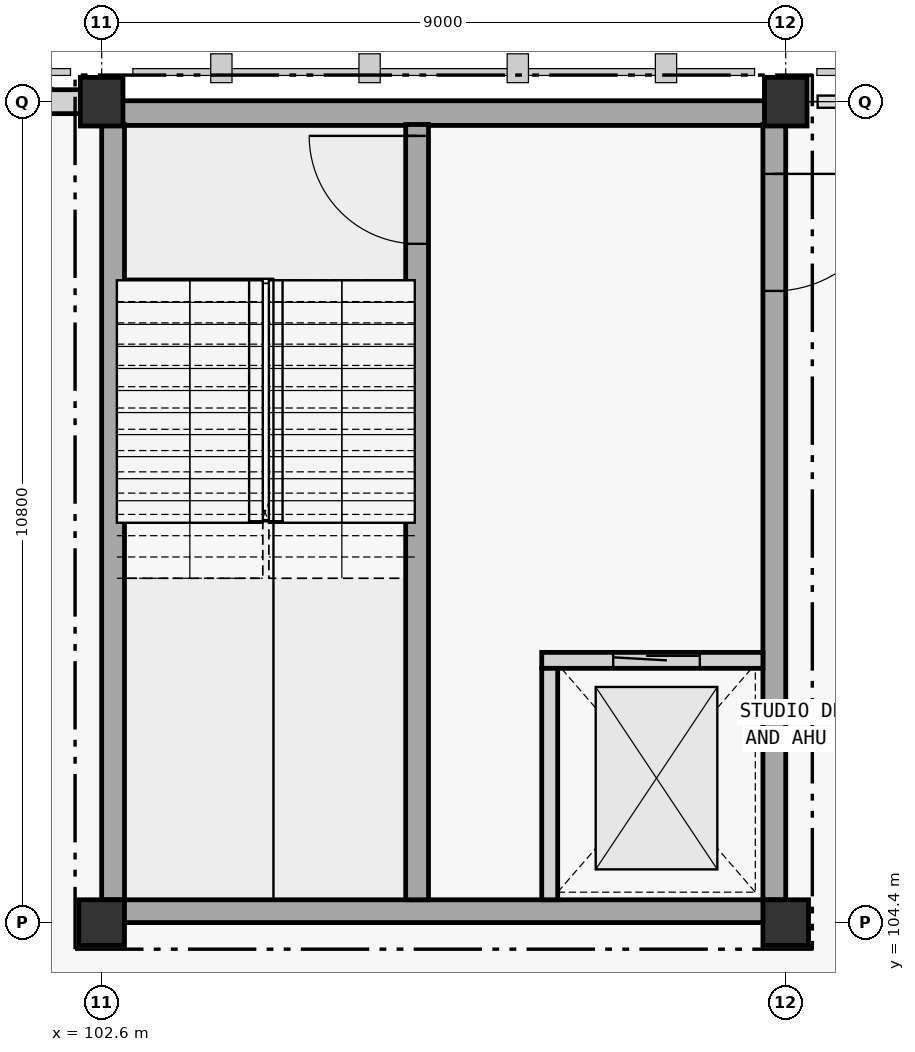
"""IFC4 building model, lengths in metres.
Left out: names, types, materials, properties, quantities, classifications, styles, units other than length and angle.
Written with IfcOpenShell. Run it as: python <this file> out.ifc"""

import sys

from ifc_helpers import new_model, si_unit, direction, frame, frame_2d, origin, origin_2d, place, context, subcontext, project, spatial, rectangle, extrude, element, fill, save


model = new_model("IFC4")
c1 = context("Model", 3, precision=1e-05, world=origin(), true_north=direction((0.0, 1.0)))
c2 = subcontext(c1, "Body", "Model", "MODEL_VIEW")
j1 = project(units=[si_unit("LENGTHUNIT", "METRE"), si_unit("PLANEANGLEUNIT", "RADIAN")], contexts=[c1])
p1 = place(None, origin())
s1 = spatial("IfcSite", under=j1, at=p1, CompositionType="ELEMENT")
p2 = place(p1, origin())
s2 = spatial("IfcBuilding", under=s1, at=p2, CompositionType="ELEMENT")
p3 = place(p2, frame((0.0, 0.0, 10.8)))
s3 = spatial("IfcBuildingStorey", under=s2, at=p3, CompositionType="ELEMENT", Elevation=10.8)
p4 = place(p3, frame((102.6, 104.4, 0.0), z_axis=(0.0, 0.0, 1.0), x_axis=(1.0, 0.0, 0.0)))
e1 = element("IfcColumn", 1, at=p4, inside=s3, PredefinedType="COLUMN", context=c2, shape_type="SweptSolid", body=[
    extrude(rectangle(XDim=0.6, YDim=0.6, at=origin_2d()), origin(), (0.0, 0.0, 1.0), 4.2),
])
p5 = place(p3, frame((102.6, 115.2, 0.0), z_axis=(0.0, 0.0, 1.0), x_axis=(1.0, 0.0, 0.0)))
e2 = element("IfcColumn", 2, at=p5, inside=s3, PredefinedType="COLUMN", context=c2, shape_type="SweptSolid", body=[
    extrude(rectangle(XDim=0.56, YDim=0.64, at=origin_2d()), origin(), (0.0, 0.0, 1.0), 4.2),
])
p6 = place(p3, frame((111.6, 104.4, 0.0), z_axis=(0.0, 0.0, 1.0), x_axis=(1.0, 0.0, 0.0)))
e3 = element("IfcColumn", 3, at=p6, inside=s3, PredefinedType="COLUMN", context=c2, shape_type="SweptSolid", body=[
    extrude(rectangle(XDim=0.6, YDim=0.6, at=origin_2d()), origin(), (0.0, 0.0, 1.0), 4.2),
])
p7 = place(p3, frame((111.6, 115.2, 0.0), z_axis=(0.0, 0.0, 1.0), x_axis=(1.0, 0.0, 0.0)))
e4 = element("IfcColumn", 4, at=p7, inside=s3, PredefinedType="COLUMN", context=c2, shape_type="SweptSolid", body=[
    extrude(rectangle(XDim=0.56, YDim=0.64, at=origin_2d()), origin(), (0.0, 0.0, 1.0), 4.2),
])
p8 = place(p3, frame((111.6, 104.55, 0.0), z_axis=(0.0, 0.0, 1.0), x_axis=(-1.0, 0.0, 0.0)))
e5 = element("IfcWall", 5, at=p8, inside=s3, PredefinedType="SHEAR", context=c2, shape_type="SweptSolid", body=[
    extrude(rectangle(XDim=9.0, YDim=0.3, at=frame_2d((4.5, 0.0))), origin(), (0.0, 0.0, 1.0), 4.2),
])
p9 = place(p3, frame((102.6, 115.05, 0.0), z_axis=(0.0, 0.0, 1.0), x_axis=(1.0, 0.0, 0.0)))
e6 = element("IfcWall", 6, at=p9, inside=s3, PredefinedType="SHEAR", context=c2, shape_type="SweptSolid", body=[
    extrude(rectangle(XDim=9.0, YDim=0.325, at=frame_2d((4.5, 0.0))), origin(), (0.0, 0.0, 1.0), 4.2),
])
p10 = place(p3, frame((102.75, 104.7, 0.0), z_axis=(0.0, 0.0, 1.0), x_axis=(0.0, 1.0, 0.0)))
e7 = element("IfcWall", 7, at=p10, inside=s3, PredefinedType="SHEAR", context=c2, shape_type="SweptSolid", body=[
    extrude(rectangle(XDim=10.2, YDim=0.3, at=frame_2d((5.1, 0.0))), origin(), (0.0, 0.0, 1.0), 4.2),
])
p11 = place(p3, frame((111.45, 114.9, 0.0), z_axis=(0.0, 0.0, 1.0), x_axis=(0.0, -1.0, 0.0)))
e8 = element("IfcWall", 8, at=p11, inside=s3, PredefinedType="SHEAR", context=c2, shape_type="SweptSolid", body=[
    extrude(rectangle(XDim=10.2, YDim=0.3, at=frame_2d((5.1, 0.0))), origin(), (0.0, 0.0, 1.0), 4.2),
])
p12 = place(p11, frame((0.65, 0.0, 0.0)))
e9 = element("IfcOpeningElement", 9, at=p12, cuts=e8, PredefinedType="OPENING", context=c2, shape_type="SweptSolid", body=[
    extrude(rectangle(XDim=1.54, YDim=2.22, at=frame_2d((0.77, 1.11))), frame((0.0, 0.15, 0.0), z_axis=(0.0, -1.0, 0.0), x_axis=(1.0, 0.0, 0.0)), (0.0, 0.0, 1.0), 0.3),
])
p13 = place(p3, frame((106.75, 104.7, 0.0), z_axis=(0.0, 0.0, 1.0), x_axis=(0.0, 1.0, 0.0)))
e10 = element("IfcWall", 10, at=p13, inside=s3, PredefinedType="SHEAR", context=c2, shape_type="SweptSolid", body=[
    extrude(rectangle(XDim=10.2, YDim=0.3, at=frame_2d((5.1, 0.0))), origin(), (0.0, 0.0, 1.0), 4.2),
])
p14 = place(p13, frame((8.63, 0.0, 0.0)))
e11 = element("IfcOpeningElement", 11, at=p14, cuts=e10, PredefinedType="OPENING", context=c2, shape_type="SweptSolid", body=[
    extrude(rectangle(XDim=1.42, YDim=2.2, at=frame_2d((0.71, 1.1))), frame((0.0, 0.15, 0.0), z_axis=(0.0, -1.0, 0.0), x_axis=(1.0, 0.0, 0.0)), (0.0, 0.0, 1.0), 0.3),
])
p15 = place(p3, frame((93.876, 115.2, 0.0), z_axis=(0.0, 0.0, 1.0), x_axis=(1.0, 0.0, 0.0)))
e12 = element("IfcWall", 12, at=p15, inside=s3, PredefinedType="STANDARD", context=c2, shape_type="SweptSolid", body=[
    extrude(rectangle(XDim=8.448, YDim=0.315, at=frame_2d((4.224, 0.0))), origin(), (0.0, 0.0, 1.0), 3.335),
])
p16 = place(p3, frame((108.39, 107.85, 0.0), z_axis=(0.0, 0.0, 1.0), x_axis=(1.0, 0.0, 0.0)))
e13 = element("IfcWall", 13, at=p16, inside=s3, PredefinedType="STANDARD", context=c2, shape_type="SweptSolid", body=[
    extrude(rectangle(XDim=2.91, YDim=0.21, at=frame_2d((1.455, 0.0))), origin(), (0.0, 0.0, 1.0), 4.2),
])
p17 = place(p16, frame((0.94, 0.0, 0.0)))
e14 = element("IfcOpeningElement", 14, at=p17, cuts=e13, PredefinedType="OPENING", context=c2, shape_type="SweptSolid", body=[
    extrude(rectangle(XDim=1.14, YDim=2.16, at=frame_2d((0.57, 1.08))), frame((0.0, 0.105, 0.0), z_axis=(0.0, -1.0, 0.0), x_axis=(1.0, 0.0, 0.0)), (0.0, 0.0, 1.0), 0.21),
])
p18 = place(p3, frame((108.495, 104.7, 0.0), z_axis=(0.0, 0.0, 1.0), x_axis=(0.0, 1.0, 0.0)))
e15 = element("IfcWall", 15, at=p18, inside=s3, PredefinedType="STANDARD", context=c2, shape_type="SweptSolid", body=[
    extrude(rectangle(XDim=3.045, YDim=0.21, at=frame_2d((1.522, 0.0))), origin(), (0.0, 0.0, 1.0), 4.2),
])
p19 = place(p17, origin())
e16 = element("IfcDoor", 16, at=p19, inside=s3, OperationType="SLIDING_TO_LEFT", PredefinedType="DOOR", context=c2, shape_type="SweptSolid", body=[
    extrude(rectangle(XDim=1.14, YDim=2.16, at=frame_2d((0.57, 1.08))), frame((0.0, 0.025, 0.0), z_axis=(0.0, -1.0, 0.0), x_axis=(1.0, 0.0, 0.0)), (0.0, 0.0, 1.0), 0.05),
])
fill(e14, e16)
p20 = place(p14, origin())
e17 = element("IfcDoor", 17, at=p20, inside=s3, OperationType="SINGLE_SWING_RIGHT", PredefinedType="DOOR", context=c2, shape_type="SweptSolid", body=[
    extrude(rectangle(XDim=1.42, YDim=2.2, at=frame_2d((0.71, 1.1))), frame((0.0, 0.025, 0.0), z_axis=(0.0, -1.0, 0.0), x_axis=(1.0, 0.0, 0.0)), (0.0, 0.0, 1.0), 0.05),
])
fill(e11, e17)
p21 = place(p12, origin())
e18 = element("IfcDoor", 18, at=p21, inside=s3, OperationType="SINGLE_SWING_LEFT", PredefinedType="DOOR", context=c2, shape_type="SweptSolid", body=[
    extrude(rectangle(XDim=1.54, YDim=2.22, at=frame_2d((0.77, 1.11))), frame((0.0, 0.025, 0.0), z_axis=(0.0, -1.0, 0.0), x_axis=(1.0, 0.0, 0.0)), (0.0, 0.0, 1.0), 0.05),
])
fill(e9, e18)
save(model, sys.argv[1])
